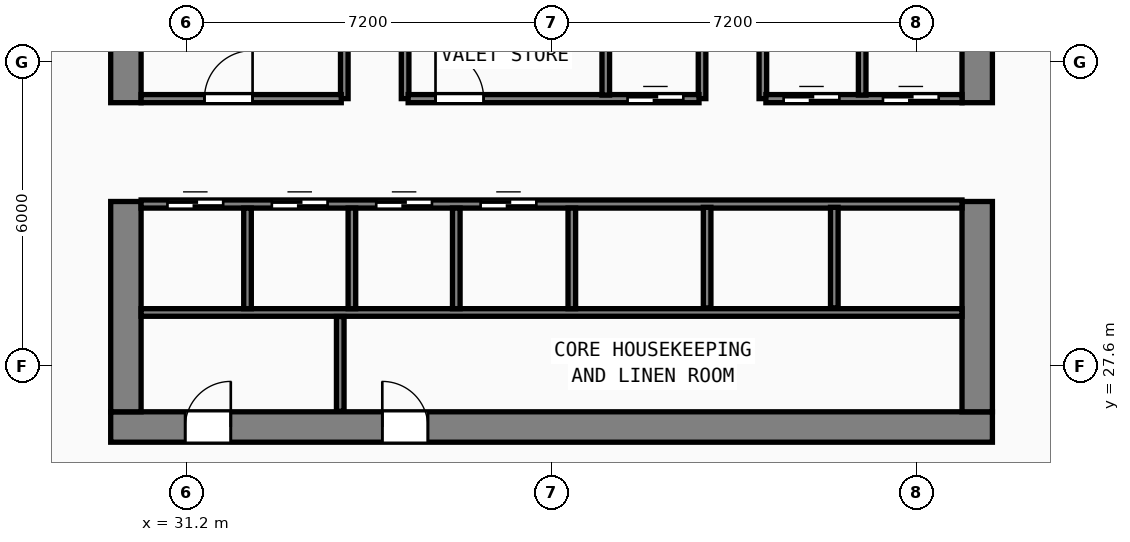
"""IFC4 building model, lengths in metres.
Left out: names, types, materials, properties, quantities, classifications, styles, units other than length and angle.
Written with IfcOpenShell. Run it as: python <this file> out.ifc"""

import sys

from ifc_helpers import new_model, si_unit, direction, frame, frame_2d, origin, place, context, subcontext, project, spatial, rectangle, extrude, element, fill, save


model = new_model("IFC4")
c1 = context("Model", 3, precision=1e-05, world=origin(), true_north=direction((0.0, 1.0)))
c2 = subcontext(c1, "Body", "Model", "MODEL_VIEW")
j1 = project(units=[si_unit("LENGTHUNIT", "METRE"), si_unit("PLANEANGLEUNIT", "RADIAN")], contexts=[c1])
p1 = place(None, origin())
s1 = spatial("IfcSite", under=j1, at=p1, CompositionType="ELEMENT")
p2 = place(p1, origin())
s2 = spatial("IfcBuilding", under=s1, at=p2, CompositionType="ELEMENT")
p3 = place(p2, frame((0.0, 0.0, 164.6)))
s3 = spatial("IfcBuildingStorey", under=s2, at=p3, CompositionType="ELEMENT", Elevation=164.6)
p4 = place(p3, frame((29.7, 26.4, 0.0), z_axis=(0.0, 0.0, 1.0), x_axis=(1.0, 0.0, 0.0)))
e1 = element("IfcWall", 1, at=p4, inside=s3, PredefinedType="SHEAR", context=c2, shape_type="SweptSolid", body=[
    extrude(rectangle(XDim=17.4, YDim=0.6, at=frame_2d((8.7, 0.0))), origin(), (0.0, 0.0, 1.0), 4.22),
])
p5 = place(p4, frame((2.37, 0.0, 0.0), z_axis=(0.0, 0.0, 1.0), x_axis=(-1.0, 0.0, 0.0)))
e2 = element("IfcOpeningElement", 2, at=p5, cuts=e1, PredefinedType="OPENING", context=c2, shape_type="SweptSolid", body=[
    extrude(rectangle(XDim=0.9, YDim=2.1, at=frame_2d((0.45, 1.05))), frame((0.0, 0.31, 0.0), z_axis=(0.0, -1.0, 0.0), x_axis=(1.0, 0.0, 0.0)), (0.0, 0.0, 1.0), 0.62),
])
p6 = place(p4, frame((6.26, 0.0, 0.0), z_axis=(0.0, 0.0, 1.0), x_axis=(-1.0, 0.0, 0.0)))
e3 = element("IfcOpeningElement", 3, at=p6, cuts=e1, PredefinedType="OPENING", context=c2, shape_type="SweptSolid", body=[
    extrude(rectangle(XDim=0.9, YDim=2.1, at=frame_2d((0.45, 1.05))), frame((0.0, 0.31, 0.0), z_axis=(0.0, -1.0, 0.0), x_axis=(1.0, 0.0, 0.0)), (0.0, 0.0, 1.0), 0.62),
])
p7 = place(p3, frame((30.0, 26.7, 0.0), z_axis=(0.0, 0.0, 1.0), x_axis=(0.0, 1.0, 0.0)))
e4 = element("IfcWall", 4, at=p7, inside=s3, PredefinedType="SHEAR", context=c2, shape_type="SweptSolid", body=[
    extrude(rectangle(XDim=4.15, YDim=0.6, at=frame_2d((2.075, 0.0))), origin(), (0.0, 0.0, 1.0), 4.22),
])
p8 = place(p3, frame((30.0, 32.8, 0.0), z_axis=(0.0, 0.0, 1.0), x_axis=(0.0, 1.0, 0.0)))
e5 = element("IfcWall", 5, at=p8, inside=s3, PredefinedType="SHEAR", context=c2, shape_type="SweptSolid", body=[
    extrude(rectangle(XDim=10.1, YDim=0.6, at=frame_2d((5.05, 0.0))), origin(), (0.0, 0.0, 1.0), 4.22),
])
p9 = place(p3, frame((46.8, 26.7, 0.0), z_axis=(0.0, 0.0, 1.0), x_axis=(0.0, 1.0, 0.0)))
e6 = element("IfcWall", 6, at=p9, inside=s3, PredefinedType="SHEAR", context=c2, shape_type="SweptSolid", body=[
    extrude(rectangle(XDim=4.15, YDim=0.6, at=frame_2d((2.075, 0.0))), origin(), (0.0, 0.0, 1.0), 4.22),
])
p10 = place(p3, frame((46.8, 32.8, 0.0), z_axis=(0.0, 0.0, 1.0), x_axis=(0.0, 1.0, 0.0)))
e7 = element("IfcWall", 7, at=p10, inside=s3, PredefinedType="SHEAR", context=c2, shape_type="SweptSolid", body=[
    extrude(rectangle(XDim=10.1, YDim=0.6, at=frame_2d((5.05, 0.0))), origin(), (0.0, 0.0, 1.0), 4.22),
])
for number, where, z_axis, x_axis in (
    (8, (34.31, 32.88, 0.0), (0.0, 0.0, 1.0), (0.0, 1.0, 0.0)),
    (9, (35.51, 32.88, 0.0), (0.0, 0.0, 1.0), (0.0, 1.0, 0.0)),
    (10, (41.37, 32.88, 0.0), (0.0, 0.0, 1.0), (0.0, 1.0, 0.0)),
    (11, (42.57, 32.88, 0.0), (0.0, 0.0, 1.0), (0.0, 1.0, 0.0)),
):
    element("IfcWall", number, at=place(p3, frame(where, z_axis=z_axis, x_axis=x_axis)), inside=s3, PredefinedType="SOLIDWALL", context=c2, shape_type="SweptSolid", body=[
        extrude(rectangle(XDim=2.17, YDim=0.15, at=frame_2d((1.085, 0.0))), origin(), (0.0, 0.0, 1.0), 4.22),
    ])
p11 = place(p3, frame((30.3, 32.88, 0.0), z_axis=(0.0, 0.0, 1.0), x_axis=(1.0, 0.0, 0.0)))
e12 = element("IfcWall", 12, at=p11, inside=s3, PredefinedType="SOLIDWALL", context=c2, shape_type="SweptSolid", body=[
    extrude(rectangle(XDim=3.95, YDim=0.16, at=frame_2d((1.975, 0.0))), origin(), (0.0, 0.0, 1.0), 4.22),
])
p12 = place(p11, frame((2.2, 0.0, 0.0), z_axis=(0.0, 0.0, 1.0), x_axis=(-1.0, 0.0, 0.0)))
e13 = element("IfcOpeningElement", 13, at=p12, cuts=e12, PredefinedType="OPENING", context=c2, shape_type="SweptSolid", body=[
    extrude(rectangle(XDim=0.95, YDim=2.12, at=frame_2d((0.475, 1.06))), frame((0.0, 0.09, 0.0), z_axis=(0.0, -1.0, 0.0), x_axis=(1.0, 0.0, 0.0)), (0.0, 0.0, 1.0), 0.18),
])
p13 = place(p3, frame((35.57, 32.88, 0.0), z_axis=(0.0, 0.0, 1.0), x_axis=(1.0, 0.0, 0.0)))
e14 = element("IfcWall", 14, at=p13, inside=s3, PredefinedType="SOLIDWALL", context=c2, shape_type="SweptSolid", body=[
    extrude(rectangle(XDim=5.74, YDim=0.16, at=frame_2d((2.87, 0.0))), origin(), (0.0, 0.0, 1.0), 4.22),
])
p14 = place(p13, frame((1.49, 0.0, 0.0), z_axis=(0.0, 0.0, 1.0), x_axis=(-1.0, 0.0, 0.0)))
e15 = element("IfcOpeningElement", 15, at=p14, cuts=e14, PredefinedType="OPENING", context=c2, shape_type="SweptSolid", body=[
    extrude(rectangle(XDim=0.95, YDim=2.12, at=frame_2d((0.475, 1.06))), frame((0.0, 0.09, 0.0), z_axis=(0.0, -1.0, 0.0), x_axis=(1.0, 0.0, 0.0)), (0.0, 0.0, 1.0), 0.18),
])
p15 = place(p13, frame((5.43, 0.0, 0.0), z_axis=(0.0, 0.0, 1.0), x_axis=(-1.0, 0.0, 0.0)))
e16 = element("IfcOpeningElement", 16, at=p15, cuts=e14, PredefinedType="OPENING", context=c2, shape_type="SweptSolid", body=[
    extrude(rectangle(XDim=1.1, YDim=2.2, at=frame_2d((0.55, 1.1))), frame((0.0, 0.09, 0.0), z_axis=(0.0, -1.0, 0.0), x_axis=(1.0, 0.0, 0.0)), (0.0, 0.0, 1.0), 0.18),
])
p16 = place(p3, frame((42.63, 32.88, 0.0), z_axis=(0.0, 0.0, 1.0), x_axis=(1.0, 0.0, 0.0)))
e17 = element("IfcWall", 17, at=p16, inside=s3, PredefinedType="SOLIDWALL", context=c2, shape_type="SweptSolid", body=[
    extrude(rectangle(XDim=3.87, YDim=0.16, at=frame_2d((1.935, 0.0))), origin(), (0.0, 0.0, 1.0), 4.22),
])
p17 = place(p16, frame((1.45, 0.0, 0.0), z_axis=(0.0, 0.0, 1.0), x_axis=(-1.0, 0.0, 0.0)))
e18 = element("IfcOpeningElement", 18, at=p17, cuts=e17, PredefinedType="OPENING", context=c2, shape_type="SweptSolid", body=[
    extrude(rectangle(XDim=1.1, YDim=2.2, at=frame_2d((0.55, 1.1))), frame((0.0, 0.09, 0.0), z_axis=(0.0, -1.0, 0.0), x_axis=(1.0, 0.0, 0.0)), (0.0, 0.0, 1.0), 0.18),
])
p18 = place(p16, frame((3.41, 0.0, 0.0), z_axis=(0.0, 0.0, 1.0), x_axis=(-1.0, 0.0, 0.0)))
e19 = element("IfcOpeningElement", 19, at=p18, cuts=e17, PredefinedType="OPENING", context=c2, shape_type="SweptSolid", body=[
    extrude(rectangle(XDim=1.1, YDim=2.2, at=frame_2d((0.55, 1.1))), frame((0.0, 0.09, 0.0), z_axis=(0.0, -1.0, 0.0), x_axis=(1.0, 0.0, 0.0)), (0.0, 0.0, 1.0), 0.18),
])
for number, where, z_axis, x_axis in (
    (20, (39.47, 32.95, 0.0), (0.0, 0.0, 1.0), (0.0, 1.0, 0.0)),
    (21, (44.53, 32.95, 0.0), (0.0, 0.0, 1.0), (0.0, 1.0, 0.0)),
):
    element("IfcWall", number, at=place(p3, frame(where, z_axis=z_axis, x_axis=x_axis)), inside=s3, PredefinedType="SOLIDWALL", context=c2, shape_type="SweptSolid", body=[
        extrude(rectangle(XDim=2.05, YDim=0.15, at=frame_2d((1.025, 0.0))), origin(), (0.0, 0.0, 1.0), 4.22),
    ])
p19 = place(p3, frame((30.3, 30.8, 0.0), z_axis=(0.0, 0.0, 1.0), x_axis=(1.0, 0.0, 0.0)))
e22 = element("IfcWall", 22, at=p19, inside=s3, PredefinedType="SOLIDWALL", context=c2, shape_type="SweptSolid", body=[
    extrude(rectangle(XDim=16.2, YDim=0.16, at=frame_2d((8.1, 0.0))), origin(), (0.0, 0.0, 1.0), 4.22),
])
p20 = place(p19, frame((0.52, 0.0, 0.0)))
e23 = element("IfcOpeningElement", 23, at=p20, cuts=e22, PredefinedType="OPENING", context=c2, shape_type="SweptSolid", body=[
    extrude(rectangle(XDim=1.1, YDim=2.2, at=frame_2d((0.55, 1.1))), frame((0.0, 0.09, 0.0), z_axis=(0.0, -1.0, 0.0), x_axis=(1.0, 0.0, 0.0)), (0.0, 0.0, 1.0), 0.18),
])
p21 = place(p19, frame((2.58, 0.0, 0.0)))
e24 = element("IfcOpeningElement", 24, at=p21, cuts=e22, PredefinedType="OPENING", context=c2, shape_type="SweptSolid", body=[
    extrude(rectangle(XDim=1.1, YDim=2.2, at=frame_2d((0.55, 1.1))), frame((0.0, 0.09, 0.0), z_axis=(0.0, -1.0, 0.0), x_axis=(1.0, 0.0, 0.0)), (0.0, 0.0, 1.0), 0.18),
])
p22 = place(p19, frame((4.64, 0.0, 0.0)))
e25 = element("IfcOpeningElement", 25, at=p22, cuts=e22, PredefinedType="OPENING", context=c2, shape_type="SweptSolid", body=[
    extrude(rectangle(XDim=1.1, YDim=2.2, at=frame_2d((0.55, 1.1))), frame((0.0, 0.09, 0.0), z_axis=(0.0, -1.0, 0.0), x_axis=(1.0, 0.0, 0.0)), (0.0, 0.0, 1.0), 0.18),
])
p23 = place(p19, frame((6.7, 0.0, 0.0)))
e26 = element("IfcOpeningElement", 26, at=p23, cuts=e22, PredefinedType="OPENING", context=c2, shape_type="SweptSolid", body=[
    extrude(rectangle(XDim=1.1, YDim=2.2, at=frame_2d((0.55, 1.1))), frame((0.0, 0.09, 0.0), z_axis=(0.0, -1.0, 0.0), x_axis=(1.0, 0.0, 0.0)), (0.0, 0.0, 1.0), 0.18),
])
p24 = place(p3, frame((30.3, 28.66, 0.0), z_axis=(0.0, 0.0, 1.0), x_axis=(1.0, 0.0, 0.0)))
e27 = element("IfcWall", 27, at=p24, inside=s3, PredefinedType="PARTITIONING", context=c2, shape_type="SweptSolid", body=[
    extrude(rectangle(XDim=16.2, YDim=0.15, at=frame_2d((8.1, 0.0))), origin(), (0.0, 0.0, 1.0), 4.22),
])
for number, where, z_axis, x_axis in (
    (28, (32.4, 28.735, 0.0), (0.0, 0.0, 1.0), (0.0, 1.0, 0.0)),
    (29, (34.46, 28.735, 0.0), (0.0, 0.0, 1.0), (0.0, 1.0, 0.0)),
    (30, (36.52, 28.735, 0.0), (0.0, 0.0, 1.0), (0.0, 1.0, 0.0)),
    (31, (38.8, 28.735, 0.0), (0.0, 0.0, 1.0), (0.0, 1.0, 0.0)),
):
    element("IfcWall", number, at=place(p3, frame(where, z_axis=z_axis, x_axis=x_axis)), inside=s3, PredefinedType="SOLIDWALL", context=c2, shape_type="SweptSolid", body=[
        extrude(rectangle(XDim=1.985, YDim=0.15, at=frame_2d((0.992, 0.0))), origin(), (0.0, 0.0, 1.0), 4.22),
    ])
p25 = place(p3, frame((34.23, 26.71, 0.0), z_axis=(0.0, 0.0, 1.0), x_axis=(0.0, 1.0, 0.0)))
e32 = element("IfcWall", 32, at=p25, inside=s3, PredefinedType="PARTITIONING", context=c2, shape_type="SweptSolid", body=[
    extrude(rectangle(XDim=1.87, YDim=0.15, at=frame_2d((0.935, 0.0))), origin(), (0.0, 0.0, 1.0), 4.22),
])
for number, where, z_axis, x_axis in (
    (33, (41.47, 28.75, 0.0), (0.0, 0.0, 1.0), (0.0, 1.0, 0.0)),
    (34, (43.98, 28.75, 0.0), (0.0, 0.0, 1.0), (0.0, 1.0, 0.0)),
):
    element("IfcWall", number, at=place(p3, frame(where, z_axis=z_axis, x_axis=x_axis)), inside=s3, PredefinedType="SOLIDWALL", context=c2, shape_type="SweptSolid", body=[
        extrude(rectangle(XDim=1.985, YDim=0.15, at=frame_2d((0.993, 0.0))), origin(), (0.0, 0.0, 1.0), 4.22),
    ])
p26 = place(p12, origin())
e35 = element("IfcDoor", 35, at=p26, inside=s3, OperationType="SINGLE_SWING_LEFT", PredefinedType="DOOR", context=c2, shape_type="SweptSolid", body=[
    extrude(rectangle(XDim=0.95, YDim=2.12, at=frame_2d((0.475, 1.06))), frame((0.0, 0.025, 0.0), z_axis=(0.0, -1.0, 0.0), x_axis=(1.0, 0.0, 0.0)), (0.0, 0.0, 1.0), 0.05),
])
fill(e13, e35)
p27 = place(p14, origin())
e36 = element("IfcDoor", 36, at=p27, inside=s3, OperationType="SINGLE_SWING_RIGHT", PredefinedType="DOOR", context=c2, shape_type="SweptSolid", body=[
    extrude(rectangle(XDim=0.95, YDim=2.12, at=frame_2d((0.475, 1.06))), frame((0.0, 0.025, 0.0), z_axis=(0.0, -1.0, 0.0), x_axis=(1.0, 0.0, 0.0)), (0.0, 0.0, 1.0), 0.05),
])
fill(e15, e36)
p28 = place(p15, origin())
e37 = element("IfcDoor", 37, at=p28, inside=s3, OperationType="SLIDING_TO_RIGHT", PredefinedType="DOOR", context=c2, shape_type="SweptSolid", body=[
    extrude(rectangle(XDim=1.1, YDim=2.2, at=frame_2d((0.55, 1.1))), frame((0.0, 0.025, 0.0), z_axis=(0.0, -1.0, 0.0), x_axis=(1.0, 0.0, 0.0)), (0.0, 0.0, 1.0), 0.05),
])
fill(e16, e37)
p29 = place(p17, origin())
e38 = element("IfcDoor", 38, at=p29, inside=s3, OperationType="SLIDING_TO_RIGHT", PredefinedType="DOOR", context=c2, shape_type="SweptSolid", body=[
    extrude(rectangle(XDim=1.1, YDim=2.2, at=frame_2d((0.55, 1.1))), frame((0.0, 0.025, 0.0), z_axis=(0.0, -1.0, 0.0), x_axis=(1.0, 0.0, 0.0)), (0.0, 0.0, 1.0), 0.05),
])
fill(e18, e38)
p30 = place(p18, origin())
e39 = element("IfcDoor", 39, at=p30, inside=s3, OperationType="SLIDING_TO_RIGHT", PredefinedType="DOOR", context=c2, shape_type="SweptSolid", body=[
    extrude(rectangle(XDim=1.1, YDim=2.2, at=frame_2d((0.55, 1.1))), frame((0.0, 0.025, 0.0), z_axis=(0.0, -1.0, 0.0), x_axis=(1.0, 0.0, 0.0)), (0.0, 0.0, 1.0), 0.05),
])
fill(e19, e39)
p31 = place(p20, origin())
e40 = element("IfcDoor", 40, at=p31, inside=s3, OperationType="SLIDING_TO_LEFT", PredefinedType="DOOR", context=c2, shape_type="SweptSolid", body=[
    extrude(rectangle(XDim=1.1, YDim=2.2, at=frame_2d((0.55, 1.1))), frame((0.0, 0.025, 0.0), z_axis=(0.0, -1.0, 0.0), x_axis=(1.0, 0.0, 0.0)), (0.0, 0.0, 1.0), 0.05),
])
fill(e23, e40)
p32 = place(p21, origin())
e41 = element("IfcDoor", 41, at=p32, inside=s3, OperationType="SLIDING_TO_LEFT", PredefinedType="DOOR", context=c2, shape_type="SweptSolid", body=[
    extrude(rectangle(XDim=1.1, YDim=2.2, at=frame_2d((0.55, 1.1))), frame((0.0, 0.025, 0.0), z_axis=(0.0, -1.0, 0.0), x_axis=(1.0, 0.0, 0.0)), (0.0, 0.0, 1.0), 0.05),
])
fill(e24, e41)
p33 = place(p22, origin())
e42 = element("IfcDoor", 42, at=p33, inside=s3, OperationType="SLIDING_TO_LEFT", PredefinedType="DOOR", context=c2, shape_type="SweptSolid", body=[
    extrude(rectangle(XDim=1.1, YDim=2.2, at=frame_2d((0.55, 1.1))), frame((0.0, 0.025, 0.0), z_axis=(0.0, -1.0, 0.0), x_axis=(1.0, 0.0, 0.0)), (0.0, 0.0, 1.0), 0.05),
])
fill(e25, e42)
p34 = place(p23, origin())
e43 = element("IfcDoor", 43, at=p34, inside=s3, OperationType="SLIDING_TO_LEFT", PredefinedType="DOOR", context=c2, shape_type="SweptSolid", body=[
    extrude(rectangle(XDim=1.1, YDim=2.2, at=frame_2d((0.55, 1.1))), frame((0.0, 0.025, 0.0), z_axis=(0.0, -1.0, 0.0), x_axis=(1.0, 0.0, 0.0)), (0.0, 0.0, 1.0), 0.05),
])
fill(e26, e43)
p35 = place(p5, origin())
e44 = element("IfcDoor", 44, at=p35, inside=s3, OperationType="SINGLE_SWING_LEFT", PredefinedType="DOOR", context=c2, shape_type="SweptSolid", body=[
    extrude(rectangle(XDim=0.9, YDim=2.1, at=frame_2d((0.45, 1.05))), frame((0.0, -0.195, 0.0), z_axis=(0.0, -1.0, 0.0), x_axis=(1.0, 0.0, 0.0)), (0.0, 0.0, 1.0), 0.05),
])
fill(e2, e44)
p36 = place(p6, origin())
e45 = element("IfcDoor", 45, at=p36, inside=s3, OperationType="SINGLE_SWING_RIGHT", PredefinedType="DOOR", context=c2, shape_type="SweptSolid", body=[
    extrude(rectangle(XDim=0.9, YDim=2.1, at=frame_2d((0.45, 1.05))), frame((0.0, -0.195, 0.0), z_axis=(0.0, -1.0, 0.0), x_axis=(1.0, 0.0, 0.0)), (0.0, 0.0, 1.0), 0.05),
])
fill(e3, e45)
save(model, sys.argv[1])
